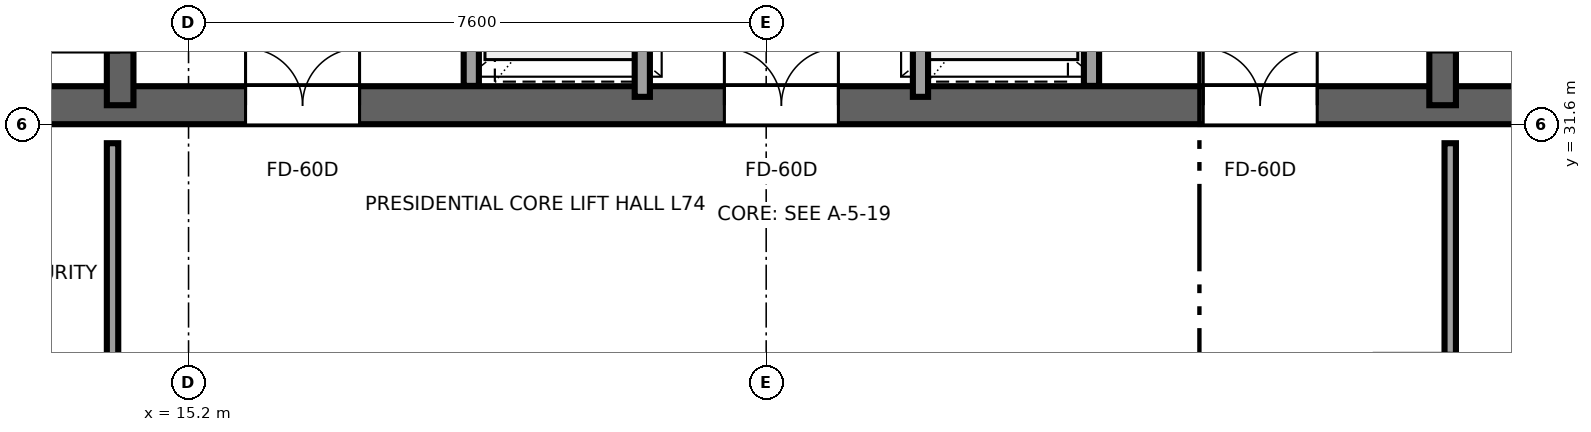
"""IFC4 building model, lengths in metres.
Left out: names, types, materials, properties, quantities, classifications, styles, units other than length and angle.
Written with IfcOpenShell. Run it as: python <this file> out.ifc"""

import sys

from ifc_helpers import new_model, si_unit, direction, frame, frame_2d, origin, place, context, subcontext, project, spatial, rectangle, extrude, source, transform, mapped, element, fill, save


model = new_model("IFC4")
c1 = context("Model", 3, precision=1e-05, world=origin(), true_north=direction((0.0, 1.0)))
c2 = subcontext(c1, "Body", "Model", "MODEL_VIEW")
j1 = project(units=[si_unit("LENGTHUNIT", "METRE"), si_unit("PLANEANGLEUNIT", "RADIAN")], contexts=[c1])
p1 = place(None, origin())
s1 = spatial("IfcSite", under=j1, at=p1, CompositionType="ELEMENT")
p2 = place(p1, origin())
s2 = spatial("IfcBuilding", under=s1, at=p2, CompositionType="ELEMENT")
p3 = place(p2, frame((0.0, 0.0, 278.6)))
s3 = spatial("IfcBuildingStorey", under=s2, at=p3, CompositionType="ELEMENT", Elevation=278.6)
p4 = place(p3, frame((10.0, 31.85, 0.0), z_axis=(0.0, 0.0, 1.0), x_axis=(1.0, 0.0, 0.0)))
e1 = element("IfcWall", 1, at=p4, inside=s3, PredefinedType="SHEAR", context=c2, shape_type="SweptSolid", body=[
    extrude(rectangle(XDim=26.0, YDim=0.5, at=frame_2d((13.0, 0.0))), origin(), (0.0, 0.0, 1.0), 3.55),
])
p5 = place(p4, frame((7.45, 0.0, 0.0), z_axis=(0.0, 0.0, 1.0), x_axis=(-1.0, 0.0, 0.0)))
e2 = element("IfcOpeningElement", 2, at=p5, cuts=e1, PredefinedType="OPENING", context=c2, shape_type="SweptSolid", body=[
    extrude(rectangle(XDim=1.5, YDim=2.04, at=frame_2d((0.75, 1.02))), frame((0.0, 0.26, 0.0), z_axis=(0.0, -1.0, 0.0), x_axis=(1.0, 0.0, 0.0)), (0.0, 0.0, 1.0), 0.52),
])
p6 = place(p4, frame((13.75, 0.0, 0.0), z_axis=(0.0, 0.0, 1.0), x_axis=(-1.0, 0.0, 0.0)))
e3 = element("IfcOpeningElement", 3, at=p6, cuts=e1, PredefinedType="OPENING", context=c2, shape_type="SweptSolid", body=[
    extrude(rectangle(XDim=1.5, YDim=2.04, at=frame_2d((0.75, 1.02))), frame((0.0, 0.26, 0.0), z_axis=(0.0, -1.0, 0.0), x_axis=(1.0, 0.0, 0.0)), (0.0, 0.0, 1.0), 0.52),
])
p7 = place(p4, frame((20.05, 0.0, 0.0), z_axis=(0.0, 0.0, 1.0), x_axis=(-1.0, 0.0, 0.0)))
e4 = element("IfcOpeningElement", 4, at=p7, cuts=e1, PredefinedType="OPENING", context=c2, shape_type="SweptSolid", body=[
    extrude(rectangle(XDim=1.5, YDim=2.04, at=frame_2d((0.75, 1.02))), frame((0.0, 0.26, 0.0), z_axis=(0.0, -1.0, 0.0), x_axis=(1.0, 0.0, 0.0)), (0.0, 0.0, 1.0), 0.52),
])
p8 = place(p3, frame((14.3, 31.85, 0.0), z_axis=(0.0, 0.0, 1.0), x_axis=(0.0, 1.0, 0.0)))
e5 = element("IfcWall", 5, at=p8, inside=s3, PredefinedType="SHEAR", context=c2, shape_type="SweptSolid", body=[
    extrude(rectangle(XDim=13.1, YDim=0.35, at=frame_2d((6.55, 0.0))), origin(), (0.0, 0.0, 1.0), 3.55),
])
p9 = place(p8, frame((0.7, 0.0, 0.0)))
e6 = element("IfcOpeningElement", 6, at=p9, cuts=e5, PredefinedType="OPENING", context=c2, shape_type="SweptSolid", body=[
    extrude(rectangle(XDim=1.1, YDim=2.12, at=frame_2d((0.55, 1.06))), frame((0.0, 0.185, 0.0), z_axis=(0.0, -1.0, 0.0), x_axis=(1.0, 0.0, 0.0)), (0.0, 0.0, 1.0), 0.37),
])
p10 = place(p3, frame((31.7, 31.85, 0.0), z_axis=(0.0, 0.0, 1.0), x_axis=(0.0, 1.0, 0.0)))
e7 = element("IfcWall", 7, at=p10, inside=s3, PredefinedType="SHEAR", context=c2, shape_type="SweptSolid", body=[
    extrude(rectangle(XDim=13.1, YDim=0.35, at=frame_2d((6.55, 0.0))), origin(), (0.0, 0.0, 1.0), 3.55),
])
p11 = place(p10, frame((1.8, 0.0, 0.0), z_axis=(0.0, 0.0, 1.0), x_axis=(-1.0, 0.0, 0.0)))
e8 = element("IfcOpeningElement", 8, at=p11, cuts=e7, PredefinedType="OPENING", context=c2, shape_type="SweptSolid", body=[
    extrude(rectangle(XDim=1.1, YDim=2.12, at=frame_2d((0.55, 1.06))), frame((0.0, 0.185, 0.0), z_axis=(0.0, -1.0, 0.0), x_axis=(1.0, 0.0, 0.0)), (0.0, 0.0, 1.0), 0.37),
])
for number, where, z_axis, x_axis in (
    (9, (18.92, 32.104, 0.0), (0.0, 0.0, 1.0), (0.0, 1.0, 0.0)),
    (10, (27.08, 32.104, 0.0), (0.0, 0.0, 1.0), (0.0, 1.0, 0.0)),
):
    element("IfcWall", number, at=place(p3, frame(where, z_axis=z_axis, x_axis=x_axis)), inside=s3, PredefinedType="SOLIDWALL", context=c2, shape_type="SweptSolid", body=[
        extrude(rectangle(XDim=4.046, YDim=0.2, at=frame_2d((2.023, 0.0))), origin(), (0.0, 0.0, 1.0), 3.33),
    ])
p12 = place(p3, frame((21.17, 31.96, 0.0), z_axis=(0.0, 0.0, 1.0), x_axis=(0.0, 1.0, 0.0)))
e11 = element("IfcWall", 11, at=p12, inside=s3, PredefinedType="SOLIDWALL", context=c2, shape_type="SweptSolid", body=[
    extrude(rectangle(XDim=5.08, YDim=0.2, at=frame_2d((2.54, 0.0))), origin(), (0.0, 0.0, 1.0), 3.33),
])
p13 = place(p12, frame((0.74, 0.0, 0.0)))
e12 = element("IfcOpeningElement", 12, at=p13, cuts=e11, PredefinedType="OPENING", context=c2, shape_type="SweptSolid", body=[
    extrude(rectangle(XDim=1.1, YDim=2.12, at=frame_2d((0.55, 1.06))), frame((0.0, 0.11, 0.0), z_axis=(0.0, -1.0, 0.0), x_axis=(1.0, 0.0, 0.0)), (0.0, 0.0, 1.0), 0.22),
])
p14 = place(p12, frame((3.24, 0.0, 0.0)))
e13 = element("IfcOpeningElement", 13, at=p14, cuts=e11, PredefinedType="OPENING", context=c2, shape_type="SweptSolid", body=[
    extrude(rectangle(XDim=1.1, YDim=2.12, at=frame_2d((0.55, 1.06))), frame((0.0, 0.11, 0.0), z_axis=(0.0, -1.0, 0.0), x_axis=(1.0, 0.0, 0.0)), (0.0, 0.0, 1.0), 0.22),
])
p15 = place(p3, frame((24.83, 31.96, 0.0), z_axis=(0.0, 0.0, 1.0), x_axis=(0.0, 1.0, 0.0)))
e14 = element("IfcWall", 14, at=p15, inside=s3, PredefinedType="SOLIDWALL", context=c2, shape_type="SweptSolid", body=[
    extrude(rectangle(XDim=5.08, YDim=0.2, at=frame_2d((2.54, 0.0))), origin(), (0.0, 0.0, 1.0), 3.33),
])
p16 = place(p15, frame((0.74, 0.0, 0.0)))
e15 = element("IfcOpeningElement", 15, at=p16, cuts=e14, PredefinedType="OPENING", context=c2, shape_type="SweptSolid", body=[
    extrude(rectangle(XDim=1.1, YDim=2.12, at=frame_2d((0.55, 1.06))), frame((0.0, 0.11, 0.0), z_axis=(0.0, -1.0, 0.0), x_axis=(1.0, 0.0, 0.0)), (0.0, 0.0, 1.0), 0.22),
])
p17 = place(p15, frame((3.24, 0.0, 0.0)))
e16 = element("IfcOpeningElement", 16, at=p17, cuts=e14, PredefinedType="OPENING", context=c2, shape_type="SweptSolid", body=[
    extrude(rectangle(XDim=1.1, YDim=2.12, at=frame_2d((0.55, 1.06))), frame((0.0, 0.11, 0.0), z_axis=(0.0, -1.0, 0.0), x_axis=(1.0, 0.0, 0.0)), (0.0, 0.0, 1.0), 0.22),
])
p18 = place(p3, frame((14.2, 24.8, 0.0), z_axis=(0.0, 0.0, 1.0), x_axis=(0.0, 1.0, 0.0)))
e17 = element("IfcWall", 17, at=p18, inside=s3, PredefinedType="PARTITIONING", context=c2, shape_type="SweptSolid", body=[
    extrude(rectangle(XDim=6.55, YDim=0.15, at=frame_2d((3.275, 0.0))), origin(), (0.0, 0.0, 1.0), 3.33),
])
p19 = place(p3, frame((31.8, 24.8, 0.0), z_axis=(0.0, 0.0, 1.0), x_axis=(0.0, 1.0, 0.0)))
e18 = element("IfcWall", 18, at=p19, inside=s3, PredefinedType="PARTITIONING", context=c2, shape_type="SweptSolid", body=[
    extrude(rectangle(XDim=6.55, YDim=0.15, at=frame_2d((3.275, 0.0))), origin(), (0.0, 0.0, 1.0), 3.33),
])
p20 = place(p19, frame((2.765, 0.0, 0.0)))
e19 = element("IfcOpeningElement", 19, at=p20, cuts=e18, PredefinedType="OPENING", context=c2, shape_type="SweptSolid", body=[
    extrude(rectangle(XDim=1.02, YDim=2.03, at=frame_2d((0.51, 1.015))), frame((0.0, 0.085, 0.0), z_axis=(0.0, -1.0, 0.0), x_axis=(1.0, 0.0, 0.0)), (0.0, 0.0, 1.0), 0.17),
])
m1 = source(origin(), c2, "Body", "SweptSolid", [
    extrude(rectangle(XDim=1.5, YDim=2.04, at=frame_2d((0.75, 1.02))), frame((0.0, 0.025, 0.0), z_axis=(0.0, -1.0, 0.0), x_axis=(1.0, 0.0, 0.0)), (0.0, 0.0, 1.0), 0.05),
])
p21 = place(p5, origin())
e20 = element("IfcDoor", 20, at=p21, inside=s3, OperationType="DOUBLE_DOOR_SINGLE_SWING", PredefinedType="DOOR", context=c2, shape_type="MappedRepresentation", body=[
    mapped(m1, transform((0.0, 0.0, 0.0), x_axis=(1.0, 0.0, 0.0), y_axis=(0.0, 1.0, 0.0), z_axis=(0.0, 0.0, 1.0), scale=1.0)),
])
fill(e2, e20)
p22 = place(p6, origin())
e21 = element("IfcDoor", 21, at=p22, inside=s3, OperationType="DOUBLE_DOOR_SINGLE_SWING", PredefinedType="DOOR", context=c2, shape_type="MappedRepresentation", body=[
    mapped(m1, transform((0.0, 0.0, 0.0), x_axis=(1.0, 0.0, 0.0), y_axis=(0.0, 1.0, 0.0), z_axis=(0.0, 0.0, 1.0), scale=1.0)),
])
fill(e3, e21)
p23 = place(p7, origin())
e22 = element("IfcDoor", 22, at=p23, inside=s3, OperationType="DOUBLE_DOOR_SINGLE_SWING", PredefinedType="DOOR", context=c2, shape_type="MappedRepresentation", body=[
    mapped(m1, transform((0.0, 0.0, 0.0), x_axis=(1.0, 0.0, 0.0), y_axis=(0.0, 1.0, 0.0), z_axis=(0.0, 0.0, 1.0), scale=1.0)),
])
fill(e4, e22)
save(model, sys.argv[1])
